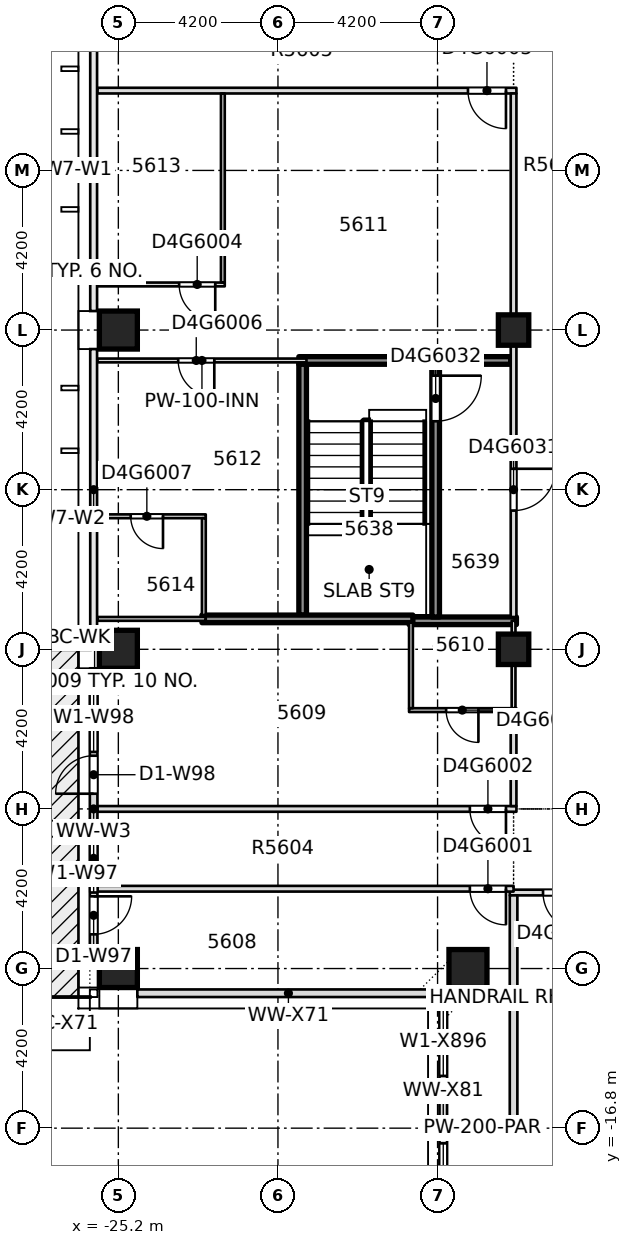
"""IFC4 building model, lengths in metres.
Left out: names, types, materials, properties, quantities, classifications, styles, units other than length and angle.
Written with IfcOpenShell. Run it as: python <this file> out.ifc"""

import sys

from ifc_helpers import new_model, si_unit, direction, frame, frame_2d, origin, origin_2d, place, context, subcontext, project, spatial, rectangle, extrude, element, fill, save


model = new_model("IFC4")
c1 = context("Model", 3, precision=1e-05, world=origin(), true_north=direction((0.0, 1.0)))
c2 = subcontext(c1, "Body", "Model", "MODEL_VIEW")
j1 = project(units=[si_unit("LENGTHUNIT", "METRE"), si_unit("PLANEANGLEUNIT", "RADIAN")], contexts=[c1])
p1 = place(None, origin())
s1 = spatial("IfcSite", under=j1, at=p1, CompositionType="ELEMENT")
p2 = place(p1, origin())
s2 = spatial("IfcBuilding", under=s1, at=p2, CompositionType="ELEMENT")
p3 = place(p2, frame((0.0, 0.0, 213.5)))
s3 = spatial("IfcBuildingStorey", under=s2, at=p3, CompositionType="ELEMENT", Elevation=213.5)
p4 = place(p3, frame((-25.2, -12.6, -0.4), z_axis=(0.0, 0.0, 1.0), x_axis=(1.0, 0.0, 0.0)))
e1 = element("IfcColumn", 1, at=p4, inside=s3, PredefinedType="COLUMN", context=c2, shape_type="SweptSolid", body=[
    extrude(rectangle(XDim=1.0, YDim=1.0, at=origin_2d()), origin(), (0.0, 0.0, 1.0), 3.4),
])
p5 = place(p3, frame((-16.0, -12.6, -0.4), z_axis=(0.0, 0.0, 1.0), x_axis=(1.0, 0.0, 0.0)))
e2 = element("IfcColumn", 2, at=p5, inside=s3, PredefinedType="COLUMN", context=c2, shape_type="SweptSolid", body=[
    extrude(rectangle(XDim=1.0, YDim=1.0, at=origin_2d()), origin(), (0.0, 0.0, 1.0), 3.85),
])
for number, where, z_axis, x_axis in (
    (3, (-25.2, -4.2, -0.4), (0.0, 0.0, 1.0), (1.0, 0.0, 0.0)),
    (4, (-25.2, 4.2, -0.4), (0.0, 0.0, 1.0), (1.0, 0.0, 0.0)),
):
    element("IfcColumn", number, at=place(p3, frame(where, z_axis=z_axis, x_axis=x_axis)), inside=s3, PredefinedType="COLUMN", context=c2, shape_type="SweptSolid", body=[
        extrude(rectangle(XDim=1.0, YDim=1.0, at=origin_2d()), origin(), (0.0, 0.0, 1.0), 3.4),
    ])
for number, where, z_axis, x_axis in (
    (5, (-14.8, -4.2, -0.4), (0.0, 0.0, 1.0), (1.0, 0.0, 0.0)),
    (6, (-14.8, 4.2, -0.4), (0.0, 0.0, 1.0), (1.0, 0.0, 0.0)),
):
    element("IfcColumn", number, at=place(p3, frame(where, z_axis=z_axis, x_axis=x_axis)), inside=s3, PredefinedType="COLUMN", context=c2, shape_type="SweptSolid", body=[
        extrude(rectangle(XDim=0.8, YDim=0.8, at=origin_2d()), origin(), (0.0, 0.0, 1.0), 3.85),
    ])
p6 = place(p3, frame((-16.55, -16.8, 0.0), z_axis=(0.0, 0.0, 1.0), x_axis=(1.0, 0.0, 0.0)))
e7 = element("IfcWall", 7, at=p6, inside=s3, PredefinedType="PARTITIONING", context=c2, shape_type="SweptSolid", body=[
    extrude(rectangle(XDim=1.848, YDim=0.2, at=frame_2d((0.924, 0.0))), origin(), (0.0, 0.0, 1.0), 3.0),
])
p7 = place(p3, frame((-14.9, -10.6, 0.0), z_axis=(0.0, 0.0, 1.0), x_axis=(1.0, 0.0, 0.0)))
e8 = element("IfcWall", 8, at=p7, inside=s3, PredefinedType="PARTITIONING", context=c2, shape_type="SweptSolid", body=[
    extrude(rectangle(XDim=6.4, YDim=0.15, at=frame_2d((3.2, 0.0))), origin(), (0.0, 0.0, 1.0), 3.0),
])
p8 = place(p7, frame((3.95, 0.0, 0.0)))
e9 = element("IfcOpeningElement", 9, at=p8, cuts=e8, PredefinedType="OPENING", context=c2, shape_type="SweptSolid", body=[
    extrude(rectangle(XDim=1.1, YDim=2.1, at=frame_2d((0.55, 1.05))), frame((0.0, 0.085, 0.0), z_axis=(0.0, -1.0, 0.0), x_axis=(1.0, 0.0, 0.0)), (0.0, 0.0, 1.0), 0.17),
])
p9 = place(p7, frame((0.875, 0.0, 0.0)))
e10 = element("IfcOpeningElement", 10, at=p9, cuts=e8, PredefinedType="OPENING", context=c2, shape_type="SweptSolid", body=[
    extrude(rectangle(XDim=1.0, YDim=2.1, at=frame_2d((0.5, 1.05))), frame((0.0, 0.085, 0.0), z_axis=(0.0, -1.0, 0.0), x_axis=(1.0, 0.0, 0.0)), (0.0, 0.0, 1.0), 0.17),
])
p10 = place(p3, frame((-25.75, -10.5, 0.0), z_axis=(0.0, 0.0, 1.0), x_axis=(1.0, 0.0, 0.0)))
e11 = element("IfcWall", 11, at=p10, inside=s3, PredefinedType="PARTITIONING", context=c2, shape_type="SweptSolid", body=[
    extrude(rectangle(XDim=10.95, YDim=0.15, at=frame_2d((5.475, 0.0))), origin(), (0.0, 0.0, 1.0), 3.0),
])
p11 = place(p10, frame((9.8, 0.0, 0.0)))
e12 = element("IfcOpeningElement", 12, at=p11, cuts=e11, PredefinedType="OPENING", context=c2, shape_type="SweptSolid", body=[
    extrude(rectangle(XDim=0.95, YDim=2.1, at=frame_2d((0.475, 1.05))), frame((0.0, 0.085, 0.0), z_axis=(0.0, -1.0, 0.0), x_axis=(1.0, 0.0, 0.0)), (0.0, 0.0, 1.0), 0.17),
])
p12 = place(p3, frame((-25.75, -8.4, 0.0), z_axis=(0.0, 0.0, 1.0), x_axis=(1.0, 0.0, 0.0)))
e13 = element("IfcWall", 13, at=p12, inside=s3, PredefinedType="PARTITIONING", context=c2, shape_type="SweptSolid", body=[
    extrude(rectangle(XDim=11.025, YDim=0.15, at=frame_2d((5.512, 0.0))), origin(), (0.0, 0.0, 1.0), 3.0),
])
p13 = place(p12, frame((9.8, 0.0, 0.0)))
e14 = element("IfcOpeningElement", 14, at=p13, cuts=e13, PredefinedType="OPENING", context=c2, shape_type="SweptSolid", body=[
    extrude(rectangle(XDim=0.95, YDim=2.1, at=frame_2d((0.475, 1.05))), frame((0.0, 0.085, 0.0), z_axis=(0.0, -1.0, 0.0), x_axis=(1.0, 0.0, 0.0)), (0.0, 0.0, 1.0), 0.17),
])
p14 = place(p3, frame((-17.55, -5.8, 0.0), z_axis=(0.0, 0.0, 1.0), x_axis=(1.0, 0.0, 0.0)))
e15 = element("IfcWall", 15, at=p14, inside=s3, PredefinedType="PARTITIONING", context=c2, shape_type="SweptSolid", body=[
    extrude(rectangle(XDim=2.825, YDim=0.1, at=frame_2d((1.413, 0.0))), origin(), (0.0, 0.0, 1.0), 3.0),
])
p15 = place(p14, frame((0.975, 0.0, 0.0)))
e16 = element("IfcOpeningElement", 16, at=p15, cuts=e15, PredefinedType="OPENING", context=c2, shape_type="SweptSolid", body=[
    extrude(rectangle(XDim=0.85, YDim=2.1, at=frame_2d((0.425, 1.05))), frame((0.0, 0.06, 0.0), z_axis=(0.0, -1.0, 0.0), x_axis=(1.0, 0.0, 0.0)), (0.0, 0.0, 1.0), 0.12),
])
p16 = place(p3, frame((-25.75, -3.4, 0.0), z_axis=(0.0, 0.0, 1.0), x_axis=(1.0, 0.0, 0.0)))
e17 = element("IfcWall", 17, at=p16, inside=s3, PredefinedType="PARTITIONING", context=c2, shape_type="SweptSolid", body=[
    extrude(rectangle(XDim=2.85, YDim=0.1, at=frame_2d((1.425, 0.0))), origin(), (0.0, 0.0, 1.0), 3.0),
])
p17 = place(p3, frame((-17.55, -3.45, 0.0), z_axis=(0.0, 0.0, 1.0), x_axis=(1.0, 0.0, 0.0)))
e18 = element("IfcWall", 18, at=p17, inside=s3, PredefinedType="SOLIDWALL", context=c2, shape_type="SweptSolid", body=[
    extrude(rectangle(XDim=2.825, YDim=0.2, at=frame_2d((1.413, 0.0))), origin(), (0.0, 0.0, 1.0), 3.0),
])
p18 = place(p3, frame((-25.75, -0.7, 0.0), z_axis=(0.0, 0.0, 1.0), x_axis=(1.0, 0.0, 0.0)))
e19 = element("IfcWall", 19, at=p18, inside=s3, PredefinedType="PARTITIONING", context=c2, shape_type="SweptSolid", body=[
    extrude(rectangle(XDim=2.85, YDim=0.1, at=frame_2d((1.425, 0.0))), origin(), (0.0, 0.0, 1.0), 3.0),
])
p19 = place(p18, frame((0.875, 0.0, 0.0)))
e20 = element("IfcOpeningElement", 20, at=p19, cuts=e19, PredefinedType="OPENING", context=c2, shape_type="SweptSolid", body=[
    extrude(rectangle(XDim=0.85, YDim=2.1, at=frame_2d((0.425, 1.05))), frame((0.0, 0.06, 0.0), z_axis=(0.0, -1.0, 0.0), x_axis=(1.0, 0.0, 0.0)), (0.0, 0.0, 1.0), 0.12),
])
p20 = place(p3, frame((-25.75, 3.4, 0.0), z_axis=(0.0, 0.0, 1.0), x_axis=(1.0, 0.0, 0.0)))
e21 = element("IfcWall", 21, at=p20, inside=s3, PredefinedType="PARTITIONING", context=c2, shape_type="SweptSolid", body=[
    extrude(rectangle(XDim=5.5, YDim=0.1, at=frame_2d((2.75, 0.0))), origin(), (0.0, 0.0, 1.0), 3.0),
])
p21 = place(p20, frame((2.125, 0.0, 0.0)))
e22 = element("IfcOpeningElement", 22, at=p21, cuts=e21, PredefinedType="OPENING", context=c2, shape_type="SweptSolid", body=[
    extrude(rectangle(XDim=0.95, YDim=2.1, at=frame_2d((0.475, 1.05))), frame((0.0, 0.06, 0.0), z_axis=(0.0, -1.0, 0.0), x_axis=(1.0, 0.0, 0.0)), (0.0, 0.0, 1.0), 0.12),
])
p22 = place(p3, frame((-20.45, 3.4, 0.0), z_axis=(0.0, 0.0, 1.0), x_axis=(1.0, 0.0, 0.0)))
e23 = element("IfcWall", 23, at=p22, inside=s3, PredefinedType="SOLIDWALL", context=c2, shape_type="SweptSolid", body=[
    extrude(rectangle(XDim=5.575, YDim=0.2, at=frame_2d((2.788, 0.0))), origin(), (0.0, 0.0, 1.0), 3.0),
])
p23 = place(p3, frame((-25.75, 5.4, 0.0), z_axis=(0.0, 0.0, 1.0), x_axis=(1.0, 0.0, 0.0)))
e24 = element("IfcWall", 24, at=p23, inside=s3, PredefinedType="PARTITIONING", context=c2, shape_type="SweptSolid", body=[
    extrude(rectangle(XDim=3.35, YDim=0.1, at=frame_2d((1.675, 0.0))), origin(), (0.0, 0.0, 1.0), 3.0),
])
p24 = place(p23, frame((2.15, 0.0, 0.0)))
e25 = element("IfcOpeningElement", 25, at=p24, cuts=e24, PredefinedType="OPENING", context=c2, shape_type="SweptSolid", body=[
    extrude(rectangle(XDim=0.95, YDim=2.1, at=frame_2d((0.475, 1.05))), frame((0.0, 0.06, 0.0), z_axis=(0.0, -1.0, 0.0), x_axis=(1.0, 0.0, 0.0)), (0.0, 0.0, 1.0), 0.12),
])
p25 = place(p3, frame((-25.75, 10.5, 0.0), z_axis=(0.0, 0.0, 1.0), x_axis=(1.0, 0.0, 0.0)))
e26 = element("IfcWall", 26, at=p25, inside=s3, PredefinedType="PARTITIONING", context=c2, shape_type="SweptSolid", body=[
    extrude(rectangle(XDim=11.025, YDim=0.15, at=frame_2d((5.512, 0.0))), origin(), (0.0, 0.0, 1.0), 3.0),
])
p26 = place(p25, frame((9.75, 0.0, 0.0)))
e27 = element("IfcOpeningElement", 27, at=p26, cuts=e26, PredefinedType="OPENING", context=c2, shape_type="SweptSolid", body=[
    extrude(rectangle(XDim=1.0, YDim=2.1, at=frame_2d((0.5, 1.05))), frame((0.0, 0.085, 0.0), z_axis=(0.0, -1.0, 0.0), x_axis=(1.0, 0.0, 0.0)), (0.0, 0.0, 1.0), 0.17),
])
p27 = place(p3, frame((-22.95, -3.3, 0.0), z_axis=(0.0, 0.0, 1.0), x_axis=(0.0, 1.0, 0.0)))
e28 = element("IfcWall", 28, at=p27, inside=s3, PredefinedType="PARTITIONING", context=c2, shape_type="SweptSolid", body=[
    extrude(rectangle(XDim=2.55, YDim=0.1, at=frame_2d((1.275, 0.0))), origin(), (0.0, 0.0, 1.0), 3.0),
])
p28 = place(p3, frame((-22.45, 5.45, 0.0), z_axis=(0.0, 0.0, 1.0), x_axis=(0.0, 1.0, 0.0)))
e29 = element("IfcWall", 29, at=p28, inside=s3, PredefinedType="PARTITIONING", context=c2, shape_type="SweptSolid", body=[
    extrude(rectangle(XDim=4.975, YDim=0.1, at=frame_2d((2.488, 0.0))), origin(), (0.0, 0.0, 1.0), 3.0),
])
p29 = place(p3, frame((-20.35, -3.3, 0.0), z_axis=(0.0, 0.0, 1.0), x_axis=(0.0, 1.0, 0.0)))
e30 = element("IfcWall", 30, at=p29, inside=s3, PredefinedType="SOLIDWALL", context=c2, shape_type="SweptSolid", body=[
    extrude(rectangle(XDim=6.6, YDim=0.2, at=frame_2d((3.3, 0.0))), origin(), (0.0, 0.0, 1.0), 3.0),
])
p30 = place(p3, frame((-17.5, -5.75, 0.0), z_axis=(0.0, 0.0, 1.0), x_axis=(0.0, 1.0, 0.0)))
e31 = element("IfcWall", 31, at=p30, inside=s3, PredefinedType="PARTITIONING", context=c2, shape_type="SweptSolid", body=[
    extrude(rectangle(XDim=2.25, YDim=0.1, at=frame_2d((1.125, 0.0))), origin(), (0.0, 0.0, 1.0), 3.0),
])
p31 = place(p3, frame((-16.85, -3.35, 0.0), z_axis=(0.0, 0.0, 1.0), x_axis=(0.0, 1.0, 0.0)))
e32 = element("IfcWall", 32, at=p31, inside=s3, PredefinedType="SOLIDWALL", context=c2, shape_type="SweptSolid", body=[
    extrude(rectangle(XDim=6.65, YDim=0.2, at=frame_2d((3.325, 0.0))), origin(), (0.0, 0.0, 1.0), 3.0),
])
p32 = place(p31, frame((5.15, 0.0, 0.0)))
e33 = element("IfcOpeningElement", 33, at=p32, cuts=e32, PredefinedType="OPENING", context=c2, shape_type="SweptSolid", body=[
    extrude(rectangle(XDim=1.2, YDim=2.1, at=frame_2d((0.6, 1.05))), frame((0.0, 0.11, 0.0), z_axis=(0.0, -1.0, 0.0), x_axis=(1.0, 0.0, 0.0)), (0.0, 0.0, 1.0), 0.22),
])
p33 = place(p3, frame((-14.8, -16.698, 0.0), z_axis=(0.0, 0.0, 1.0), x_axis=(0.0, 1.0, 0.0)))
e34 = element("IfcWall", 34, at=p33, inside=s3, PredefinedType="PARTITIONING", context=c2, shape_type="SweptSolid", body=[
    extrude(rectangle(XDim=6.023, YDim=0.2, at=frame_2d((3.011, 0.0))), origin(), (0.0, 0.0, 1.0), 3.0),
])
p34 = place(p3, frame((-14.8, -8.325, 0.0), z_axis=(0.0, 0.0, 1.0), x_axis=(0.0, 1.0, 0.0)))
e35 = element("IfcWall", 35, at=p34, inside=s3, PredefinedType="PARTITIONING", context=c2, shape_type="SweptSolid", body=[
    extrude(rectangle(XDim=2.475, YDim=0.15, at=frame_2d((1.237, 0.0))), origin(), (0.0, 0.0, 1.0), 3.0),
])
p35 = place(p3, frame((-14.8, -5.75, 0.0), z_axis=(0.0, 0.0, 1.0), x_axis=(0.0, 1.0, 0.0)))
e36 = element("IfcWall", 36, at=p35, inside=s3, PredefinedType="PARTITIONING", context=c2, shape_type="SweptSolid", body=[
    extrude(rectangle(XDim=2.3, YDim=0.1, at=frame_2d((1.15, 0.0))), origin(), (0.0, 0.0, 1.0), 3.0),
])
p36 = place(p3, frame((-14.8, -3.35, 0.0), z_axis=(0.0, 0.0, 1.0), x_axis=(0.0, 1.0, 0.0)))
e37 = element("IfcWall", 37, at=p36, inside=s3, PredefinedType="PARTITIONING", context=c2, shape_type="SweptSolid", body=[
    extrude(rectangle(XDim=13.775, YDim=0.15, at=frame_2d((6.888, 0.0))), origin(), (0.0, 0.0, 1.0), 3.0),
])
p37 = place(p36, frame((2.8, 0.0, 0.0)))
e38 = element("IfcOpeningElement", 38, at=p37, cuts=e37, PredefinedType="OPENING", context=c2, shape_type="SweptSolid", body=[
    extrude(rectangle(XDim=1.1, YDim=2.1, at=frame_2d((0.55, 1.05))), frame((0.0, 0.085, 0.0), z_axis=(0.0, -1.0, 0.0), x_axis=(1.0, 0.0, 0.0)), (0.0, 0.0, 1.0), 0.17),
])
p38 = place(p3, frame((-25.85, -4.7, 0.0), z_axis=(0.0, 0.0, 1.0), x_axis=(0.0, -1.0, 0.0)))
e39 = element("IfcWall", 39, at=p38, inside=s3, PredefinedType="STANDARD", context=c2, shape_type="SweptSolid", body=[
    extrude(rectangle(XDim=7.4, YDim=0.2, at=frame_2d((3.7, 0.0))), origin(), (0.0, 0.0, 1.0), 3.0),
])
p39 = place(p38, frame((4.1, 0.0, 0.2)))
e40 = element("IfcOpeningElement", 40, at=p39, cuts=e39, PredefinedType="OPENING", context=c2, shape_type="SweptSolid", body=[
    extrude(rectangle(XDim=1.8, YDim=2.65, at=frame_2d((0.9, 1.325))), frame((0.0, 0.11, 0.0), z_axis=(0.0, -1.0, 0.0), x_axis=(1.0, 0.0, 0.0)), (0.0, 0.0, 1.0), 0.22),
])
p40 = place(p38, frame((6.0, 0.0, 0.0)))
e41 = element("IfcOpeningElement", 41, at=p40, cuts=e39, PredefinedType="OPENING", context=c2, shape_type="SweptSolid", body=[
    extrude(rectangle(XDim=1.0, YDim=2.4, at=frame_2d((0.5, 1.2))), frame((0.0, 0.11, 0.0), z_axis=(0.0, -1.0, 0.0), x_axis=(1.0, 0.0, 0.0)), (0.0, 0.0, 1.0), 0.22),
])
p41 = place(p38, frame((0.4, 0.0, 0.2)))
e42 = element("IfcOpeningElement", 42, at=p41, cuts=e39, PredefinedType="OPENING", context=c2, shape_type="SweptSolid", body=[
    extrude(rectangle(XDim=1.8, YDim=2.65, at=frame_2d((0.9, 1.325))), frame((0.0, 0.11, 0.0), z_axis=(0.0, -1.0, 0.0), x_axis=(1.0, 0.0, 0.0)), (0.0, 0.0, 1.0), 0.22),
])
p42 = place(p38, frame((2.3, 0.0, 0.0)))
e43 = element("IfcOpeningElement", 43, at=p42, cuts=e39, PredefinedType="OPENING", context=c2, shape_type="SweptSolid", body=[
    extrude(rectangle(XDim=1.0, YDim=2.4, at=frame_2d((0.5, 1.2))), frame((0.0, 0.11, 0.0), z_axis=(0.0, -1.0, 0.0), x_axis=(1.0, 0.0, 0.0)), (0.0, 0.0, 1.0), 0.22),
])
p43 = place(p3, frame((-24.7, -13.25, 0.0), z_axis=(0.0, 0.0, 1.0), x_axis=(1.0, 0.0, 0.0)))
e44 = element("IfcWall", 44, at=p43, inside=s3, PredefinedType="STANDARD", context=c2, shape_type="SweptSolid", body=[
    extrude(rectangle(XDim=7.95, YDim=0.2, at=frame_2d((3.975, 0.0))), origin(), (0.0, 0.0, 1.0), 3.0),
])
p44 = place(p3, frame((-16.65, -13.35, 0.0), z_axis=(0.0, 0.0, 1.0), x_axis=(0.0, -1.0, 0.0)))
e45 = element("IfcWall", 45, at=p44, inside=s3, PredefinedType="STANDARD", context=c2, shape_type="SweptSolid", body=[
    extrude(rectangle(XDim=7.15, YDim=0.2, at=frame_2d((3.575, 0.0))), origin(), (0.0, 0.0, 1.0), 3.0),
])
p45 = place(p44, frame((3.85, 0.0, 0.2)))
e46 = element("IfcOpeningElement", 46, at=p45, cuts=e45, PredefinedType="OPENING", context=c2, shape_type="SweptSolid", body=[
    extrude(rectangle(XDim=1.8, YDim=2.65, at=frame_2d((0.9, 1.325))), frame((0.0, 0.11, 0.0), z_axis=(0.0, -1.0, 0.0), x_axis=(1.0, 0.0, 0.0)), (0.0, 0.0, 1.0), 0.22),
])
p46 = place(p44, frame((0.275, 0.0, 0.2)))
e47 = element("IfcOpeningElement", 47, at=p46, cuts=e45, PredefinedType="OPENING", context=c2, shape_type="SweptSolid", body=[
    extrude(rectangle(XDim=1.8, YDim=2.65, at=frame_2d((0.9, 1.325))), frame((0.0, 0.11, 0.0), z_axis=(0.0, -1.0, 0.0), x_axis=(1.0, 0.0, 0.0)), (0.0, 0.0, 1.0), 0.22),
])
p47 = place(p3, frame((-23.0, -3.4, 0.0), z_axis=(0.0, 0.0, 1.0), x_axis=(1.0, 0.0, 0.0)))
e48 = element("IfcWall", 48, at=p47, inside=s3, PredefinedType="SOLIDWALL", context=c2, shape_type="SweptSolid", body=[
    extrude(rectangle(XDim=5.55, YDim=0.2, at=frame_2d((2.775, 0.0))), origin(), (0.0, 0.0, 1.0), 3.0),
])
p48 = place(p11, origin())
e49 = element("IfcDoor", 49, at=p48, inside=s3, OperationType="SINGLE_SWING_RIGHT", PredefinedType="DOOR", context=c2, shape_type="SweptSolid", body=[
    extrude(rectangle(XDim=0.95, YDim=2.1, at=frame_2d((0.475, 1.05))), frame((0.0, 0.025, 0.0), z_axis=(0.0, -1.0, 0.0), x_axis=(1.0, 0.0, 0.0)), (0.0, 0.0, 1.0), 0.05),
])
fill(e12, e49)
p49 = place(p13, origin())
e50 = element("IfcDoor", 50, at=p49, inside=s3, OperationType="SINGLE_SWING_LEFT", PredefinedType="DOOR", context=c2, shape_type="SweptSolid", body=[
    extrude(rectangle(XDim=0.95, YDim=2.1, at=frame_2d((0.475, 1.05))), frame((0.0, 0.025, 0.0), z_axis=(0.0, -1.0, 0.0), x_axis=(1.0, 0.0, 0.0)), (0.0, 0.0, 1.0), 0.05),
])
fill(e14, e50)
p50 = place(p15, origin())
e51 = element("IfcDoor", 51, at=p50, inside=s3, OperationType="SINGLE_SWING_LEFT", PredefinedType="DOOR", context=c2, shape_type="SweptSolid", body=[
    extrude(rectangle(XDim=0.85, YDim=2.1, at=frame_2d((0.425, 1.05))), frame((0.0, 0.025, 0.0), z_axis=(0.0, -1.0, 0.0), x_axis=(1.0, 0.0, 0.0)), (0.0, 0.0, 1.0), 0.05),
])
fill(e16, e51)
p51 = place(p24, origin())
e52 = element("IfcDoor", 52, at=p51, inside=s3, OperationType="SINGLE_SWING_RIGHT", PredefinedType="DOOR", context=c2, shape_type="SweptSolid", body=[
    extrude(rectangle(XDim=0.95, YDim=2.1, at=frame_2d((0.475, 1.05))), frame((0.0, 0.025, 0.0), z_axis=(0.0, -1.0, 0.0), x_axis=(1.0, 0.0, 0.0)), (0.0, 0.0, 1.0), 0.05),
])
fill(e25, e52)
p52 = place(p26, origin())
e53 = element("IfcDoor", 53, at=p52, inside=s3, OperationType="SINGLE_SWING_RIGHT", PredefinedType="DOOR", context=c2, shape_type="SweptSolid", body=[
    extrude(rectangle(XDim=1.0, YDim=2.1, at=frame_2d((0.5, 1.05))), frame((0.0, 0.025, 0.0), z_axis=(0.0, -1.0, 0.0), x_axis=(1.0, 0.0, 0.0)), (0.0, 0.0, 1.0), 0.05),
])
fill(e27, e53)
p53 = place(p21, origin())
e54 = element("IfcDoor", 54, at=p53, inside=s3, OperationType="SINGLE_SWING_LEFT", PredefinedType="DOOR", context=c2, shape_type="SweptSolid", body=[
    extrude(rectangle(XDim=0.95, YDim=2.1, at=frame_2d((0.475, 1.05))), frame((0.0, 0.025, 0.0), z_axis=(0.0, -1.0, 0.0), x_axis=(1.0, 0.0, 0.0)), (0.0, 0.0, 1.0), 0.05),
])
fill(e22, e54)
p54 = place(p19, origin())
e55 = element("IfcDoor", 55, at=p54, inside=s3, OperationType="SINGLE_SWING_RIGHT", PredefinedType="DOOR", context=c2, shape_type="SweptSolid", body=[
    extrude(rectangle(XDim=0.85, YDim=2.1, at=frame_2d((0.425, 1.05))), frame((0.0, 0.025, 0.0), z_axis=(0.0, -1.0, 0.0), x_axis=(1.0, 0.0, 0.0)), (0.0, 0.0, 1.0), 0.05),
])
fill(e20, e55)
p55 = place(p37, origin())
e56 = element("IfcDoor", 56, at=p55, inside=s3, OperationType="SINGLE_SWING_RIGHT", PredefinedType="DOOR", context=c2, shape_type="SweptSolid", body=[
    extrude(rectangle(XDim=1.1, YDim=2.1, at=frame_2d((0.55, 1.05))), frame((0.0, 0.025, 0.0), z_axis=(0.0, -1.0, 0.0), x_axis=(1.0, 0.0, 0.0)), (0.0, 0.0, 1.0), 0.05),
])
fill(e38, e56)
p56 = place(p32, origin())
e57 = element("IfcDoor", 57, at=p56, inside=s3, OperationType="SINGLE_SWING_RIGHT", PredefinedType="DOOR", context=c2, shape_type="SweptSolid", body=[
    extrude(rectangle(XDim=1.2, YDim=2.1, at=frame_2d((0.6, 1.05))), frame((0.0, 0.025, 0.0), z_axis=(0.0, -1.0, 0.0), x_axis=(1.0, 0.0, 0.0)), (0.0, 0.0, 1.0), 0.05),
])
fill(e33, e57)
p57 = place(p9, origin())
e58 = element("IfcDoor", 58, at=p57, inside=s3, OperationType="SINGLE_SWING_RIGHT", PredefinedType="DOOR", context=c2, shape_type="SweptSolid", body=[
    extrude(rectangle(XDim=1.0, YDim=2.1, at=frame_2d((0.5, 1.05))), frame((0.0, 0.025, 0.0), z_axis=(0.0, -1.0, 0.0), x_axis=(1.0, 0.0, 0.0)), (0.0, 0.0, 1.0), 0.05),
])
fill(e10, e58)
p58 = place(p39, origin())
e59 = element("IfcWindow", 59, at=p58, inside=s3, PartitioningType="SINGLE_PANEL", PredefinedType="WINDOW", context=c2, shape_type="SweptSolid", body=[
    extrude(rectangle(XDim=1.8, YDim=2.65, at=frame_2d((0.9, 1.325))), frame((0.0, 0.03, 0.0), z_axis=(0.0, -1.0, 0.0), x_axis=(1.0, 0.0, 0.0)), (0.0, 0.0, 1.0), 0.06),
])
fill(e40, e59)
p59 = place(p40, origin())
e60 = element("IfcDoor", 60, at=p59, inside=s3, OperationType="SINGLE_SWING_LEFT", PredefinedType="DOOR", context=c2, shape_type="SweptSolid", body=[
    extrude(rectangle(XDim=1.0, YDim=2.4, at=frame_2d((0.5, 1.2))), frame((0.0, 0.025, 0.0), z_axis=(0.0, -1.0, 0.0), x_axis=(1.0, 0.0, 0.0)), (0.0, 0.0, 1.0), 0.05),
])
fill(e41, e60)
p60 = place(p41, origin())
e61 = element("IfcWindow", 61, at=p60, inside=s3, PartitioningType="SINGLE_PANEL", PredefinedType="WINDOW", context=c2, shape_type="SweptSolid", body=[
    extrude(rectangle(XDim=1.8, YDim=2.65, at=frame_2d((0.9, 1.325))), frame((0.0, 0.03, 0.0), z_axis=(0.0, -1.0, 0.0), x_axis=(1.0, 0.0, 0.0)), (0.0, 0.0, 1.0), 0.06),
])
fill(e42, e61)
p61 = place(p42, origin())
e62 = element("IfcDoor", 62, at=p61, inside=s3, OperationType="SINGLE_SWING_LEFT", PredefinedType="DOOR", context=c2, shape_type="SweptSolid", body=[
    extrude(rectangle(XDim=1.0, YDim=2.4, at=frame_2d((0.5, 1.2))), frame((0.0, 0.025, 0.0), z_axis=(0.0, -1.0, 0.0), x_axis=(1.0, 0.0, 0.0)), (0.0, 0.0, 1.0), 0.05),
])
fill(e43, e62)
p62 = place(p45, origin())
e63 = element("IfcWindow", 63, at=p62, inside=s3, PartitioningType="SINGLE_PANEL", PredefinedType="WINDOW", context=c2, shape_type="SweptSolid", body=[
    extrude(rectangle(XDim=1.8, YDim=2.65, at=frame_2d((0.9, 1.325))), frame((0.0, 0.03, 0.0), z_axis=(0.0, -1.0, 0.0), x_axis=(1.0, 0.0, 0.0)), (0.0, 0.0, 1.0), 0.06),
])
fill(e46, e63)
p63 = place(p46, origin())
e64 = element("IfcWindow", 64, at=p63, inside=s3, PartitioningType="SINGLE_PANEL", PredefinedType="WINDOW", context=c2, shape_type="SweptSolid", body=[
    extrude(rectangle(XDim=1.8, YDim=2.65, at=frame_2d((0.9, 1.325))), frame((0.0, 0.03, 0.0), z_axis=(0.0, -1.0, 0.0), x_axis=(1.0, 0.0, 0.0)), (0.0, 0.0, 1.0), 0.06),
])
fill(e47, e64)
save(model, sys.argv[1])
